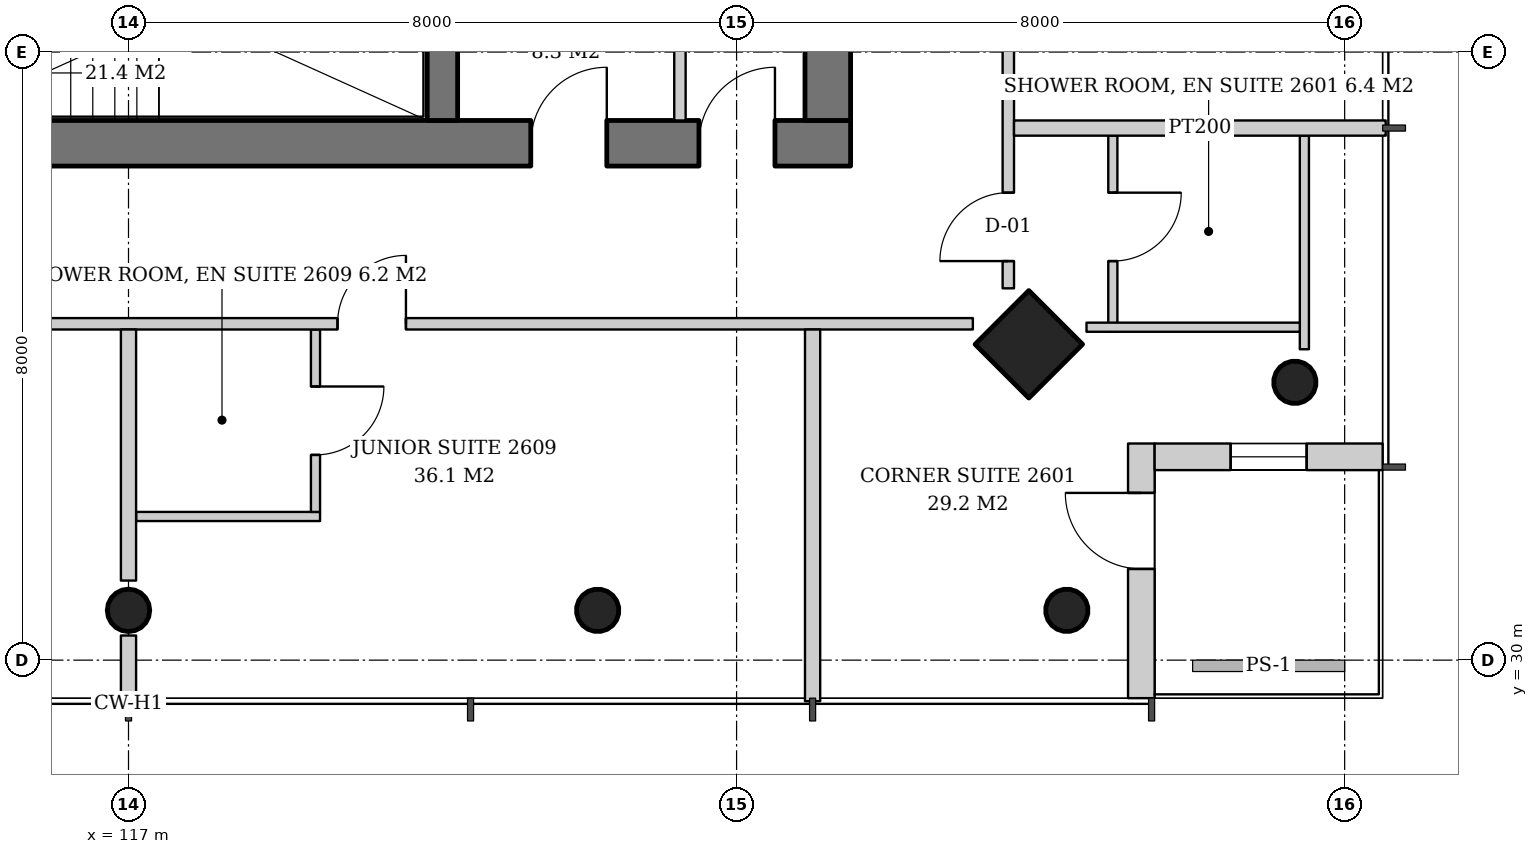
"""IFC4 building model, lengths in metres.
Left out: names, types, materials, properties, quantities, classifications, styles, units other than length and angle.
Written with IfcOpenShell. Run it as: python <this file> out.ifc"""

import sys

from ifc_helpers import new_model, si_unit, direction, frame, frame_2d, origin, origin_2d, place, context, subcontext, project, spatial, rectangle, hollow_circle, extrude, element, fill, save


model = new_model("IFC4")
c1 = context("Model", 3, precision=1e-05, world=origin(), true_north=direction((0.0, 1.0)))
c2 = subcontext(c1, "Body", "Model", "MODEL_VIEW")
j1 = project(units=[si_unit("LENGTHUNIT", "METRE"), si_unit("PLANEANGLEUNIT", "RADIAN")], contexts=[c1])
p1 = place(None, origin())
s1 = spatial("IfcSite", under=j1, at=p1, CompositionType="ELEMENT")
p2 = place(p1, origin())
s2 = spatial("IfcBuilding", under=s1, at=p2, CompositionType="ELEMENT")
p3 = place(p2, frame((0.0, 0.0, 104.6)))
s3 = spatial("IfcBuildingStorey", under=s2, at=p3, CompositionType="ELEMENT", Elevation=104.6)
p4 = place(p3, frame((132.396, 33.604, 0.0), z_axis=(-0.043032401563, 0.043032401563, 0.998146494675), x_axis=(-0.707106781187, -0.707106781187, 0.0)))
e1 = element("IfcColumn", 1, at=p4, inside=s3, PredefinedType="COLUMN", context=c2, shape_type="SweptSolid", body=[
    extrude(hollow_circle(Radius=0.28, WallThickness=0.02, at=origin_2d()), origin(), (0.0, 0.0, 1.0), 3.807),
])
p5 = place(p3, frame((128.896, 34.104, 0.0), z_axis=(-0.043032401563, 0.043032401563, 0.998146494675), x_axis=(-0.707106781187, -0.707106781187, 0.0)))
e2 = element("IfcColumn", 2, at=p5, inside=s3, PredefinedType="COLUMN", context=c2, shape_type="SweptSolid", body=[
    extrude(rectangle(XDim=1.0, YDim=1.0, at=origin_2d()), origin(), (0.0, 0.0, 1.0), 3.807),
])
p6 = place(p3, frame((129.396, 30.604, 0.0), z_axis=(-0.043032401563, 0.043032401563, 0.998146494675), x_axis=(-0.707106781187, -0.707106781187, 0.0)))
e3 = element("IfcColumn", 3, at=p6, inside=s3, PredefinedType="COLUMN", context=c2, shape_type="SweptSolid", body=[
    extrude(hollow_circle(Radius=0.28, WallThickness=0.02, at=origin_2d()), origin(), (0.0, 0.0, 1.0), 3.807),
])
p7 = place(p3, frame((117.0, 30.604, 0.0), z_axis=(0.0, 0.043072300418, 0.999071957837), x_axis=(-1.0, 0.0, 0.0)))
e4 = element("IfcColumn", 4, at=p7, inside=s3, PredefinedType="COLUMN", context=c2, shape_type="SweptSolid", body=[
    extrude(hollow_circle(Radius=0.28, WallThickness=0.02, at=origin_2d()), origin(), (0.0, 0.0, 1.0), 3.803),
])
p8 = place(p3, frame((123.198, 30.604, 0.0), z_axis=(-0.02149908433, 0.04306234503, 0.998841040313), x_axis=(-0.894693706707, -0.446680166538, 0.0)))
e5 = element("IfcColumn", 5, at=p8, inside=s3, PredefinedType="COLUMN", context=c2, shape_type="SweptSolid", body=[
    extrude(hollow_circle(Radius=0.28, WallThickness=0.02, at=origin_2d()), origin(), (0.0, 0.0, 1.0), 3.804),
])
p9 = place(p3, frame((107.5, 36.8, 0.0), z_axis=(0.0, 0.0, 1.0), x_axis=(1.0, 0.0, 0.0)))
e6 = element("IfcWall", 6, at=p9, inside=s3, PredefinedType="SHEAR", context=c2, shape_type="SweptSolid", body=[
    extrude(rectangle(XDim=19.0, YDim=0.6, at=frame_2d((9.5, 0.0))), origin(), (0.0, 0.0, 1.0), 3.8),
])
p10 = place(p9, frame((3.9, 0.0, 0.0)))
e7 = element("IfcOpeningElement", 7, at=p10, cuts=e6, PredefinedType="OPENING", context=c2, shape_type="SweptSolid", body=[
    extrude(rectangle(XDim=1.0, YDim=2.1, at=frame_2d((0.5, 1.05))), frame((0.0, 0.31, 0.0), z_axis=(0.0, -1.0, 0.0), x_axis=(1.0, 0.0, 0.0)), (0.0, 0.0, 1.0), 0.62),
])
p11 = place(p9, frame((14.792, 0.0, 0.0)))
e8 = element("IfcOpeningElement", 8, at=p11, cuts=e6, PredefinedType="OPENING", context=c2, shape_type="SweptSolid", body=[
    extrude(rectangle(XDim=1.0, YDim=2.1, at=frame_2d((0.5, 1.05))), frame((0.0, 0.31, 0.0), z_axis=(0.0, -1.0, 0.0), x_axis=(1.0, 0.0, 0.0)), (0.0, 0.0, 1.0), 0.62),
])
p12 = place(p9, frame((17.005, 0.0, 0.0)))
e9 = element("IfcOpeningElement", 9, at=p12, cuts=e6, PredefinedType="OPENING", context=c2, shape_type="SweptSolid", body=[
    extrude(rectangle(XDim=1.0, YDim=2.1, at=frame_2d((0.5, 1.05))), frame((0.0, 0.31, 0.0), z_axis=(0.0, -1.0, 0.0), x_axis=(1.0, 0.0, 0.0)), (0.0, 0.0, 1.0), 0.62),
])
p13 = place(p3, frame((126.2, 37.1, 0.0), z_axis=(0.0, 0.0, 1.0), x_axis=(0.0, 1.0, 0.0)))
e10 = element("IfcWall", 10, at=p13, inside=s3, PredefinedType="SHEAR", context=c2, shape_type="SweptSolid", body=[
    extrude(rectangle(XDim=17.8, YDim=0.6, at=frame_2d((8.9, 0.0))), origin(), (0.0, 0.0, 1.0), 3.8),
])
p14 = place(p13, frame((8.0, 0.0, 0.0)))
e11 = element("IfcOpeningElement", 11, at=p14, cuts=e10, PredefinedType="OPENING", context=c2, shape_type="SweptSolid", body=[
    extrude(rectangle(XDim=1.8, YDim=2.4, at=frame_2d((0.9, 1.2))), frame((0.0, 0.31, 0.0), z_axis=(0.0, -1.0, 0.0), x_axis=(1.0, 0.0, 0.0)), (0.0, 0.0, 1.0), 0.62),
])
p15 = place(p3, frame((121.13, 37.1, 0.0), z_axis=(0.0, 0.0, 1.0), x_axis=(0.0, 1.0, 0.0)))
e12 = element("IfcWall", 12, at=p15, inside=s3, PredefinedType="SHEAR", context=c2, shape_type="SweptSolid", body=[
    extrude(rectangle(XDim=2.9, YDim=0.4, at=frame_2d((1.45, 0.0))), origin(), (0.0, 0.0, 1.0), 3.8),
])
p16 = place(p3, frame((130.325, 29.5, 0.0), z_axis=(0.0, 0.0, 1.0), x_axis=(0.0, 1.0, 0.0)))
e13 = element("IfcWall", 13, at=p16, inside=s3, PredefinedType="SOLIDWALL", context=c2, shape_type="SweptSolid", body=[
    extrude(rectangle(XDim=3.35, YDim=0.35, at=frame_2d((1.675, 0.0))), origin(), (0.0, 0.0, 1.0), 3.6),
])
p17 = place(p16, frame((1.7, 0.0, 0.0)))
e14 = element("IfcOpeningElement", 14, at=p17, cuts=e13, PredefinedType="OPENING", context=c2, shape_type="SweptSolid", body=[
    extrude(rectangle(XDim=1.0, YDim=2.4, at=frame_2d((0.5, 1.2))), frame((0.0, 0.185, 0.0), z_axis=(0.0, -1.0, 0.0), x_axis=(1.0, 0.0, 0.0)), (0.0, 0.0, 1.0), 0.37),
])
p18 = place(p3, frame((130.5, 32.675, 0.0), z_axis=(0.0, 0.0, 1.0), x_axis=(1.0, 0.0, 0.0)))
e15 = element("IfcWall", 15, at=p18, inside=s3, PredefinedType="SOLIDWALL", context=c2, shape_type="SweptSolid", body=[
    extrude(rectangle(XDim=3.0, YDim=0.35, at=frame_2d((1.5, 0.0))), origin(), (0.0, 0.0, 1.0), 3.6),
])
p19 = place(p18, frame((1.0, 0.0, 0.9)))
e16 = element("IfcOpeningElement", 16, at=p19, cuts=e15, PredefinedType="OPENING", context=c2, shape_type="SweptSolid", body=[
    extrude(rectangle(XDim=1.0, YDim=2.4, at=frame_2d((0.5, 1.2))), frame((0.0, 0.185, 0.0), z_axis=(0.0, -1.0, 0.0), x_axis=(1.0, 0.0, 0.0)), (0.0, 0.0, 1.0), 0.37),
])
p20 = place(p3, frame((124.255, 37.1, 0.0), z_axis=(0.0, 0.0, 1.0), x_axis=(0.0, 1.0, 0.0)))
e17 = element("IfcWall", 17, at=p20, inside=s3, PredefinedType="SOLIDWALL", context=c2, shape_type="SweptSolid", body=[
    extrude(rectangle(XDim=2.9, YDim=0.15, at=frame_2d((1.45, 0.0))), origin(), (0.0, 0.0, 1.0), 3.6),
])
p21 = place(p3, frame((129.95, 36.9, 0.0), z_axis=(0.0, 0.0, 1.0), x_axis=(0.0, -1.0, 0.0)))
e18 = element("IfcWall", 18, at=p21, inside=s3, PredefinedType="PARTITIONING", context=c2, shape_type="SweptSolid", body=[
    extrude(rectangle(XDim=2.58, YDim=0.12, at=frame_2d((1.29, 0.0))), origin(), (0.0, 0.0, 1.0), 2.9),
])
p22 = place(p21, frame((0.75, 0.0, 0.0)))
e19 = element("IfcOpeningElement", 19, at=p22, cuts=e18, PredefinedType="OPENING", context=c2, shape_type="SweptSolid", body=[
    extrude(rectangle(XDim=0.9, YDim=2.1, at=frame_2d((0.45, 1.05))), frame((0.0, 0.07, 0.0), z_axis=(0.0, -1.0, 0.0), x_axis=(1.0, 0.0, 0.0)), (0.0, 0.0, 1.0), 0.14),
])
p23 = place(p3, frame((132.47, 36.9, 0.0), z_axis=(0.0, 0.0, 1.0), x_axis=(0.0, -1.0, 0.0)))
e20 = element("IfcWall", 20, at=p23, inside=s3, PredefinedType="PARTITIONING", context=c2, shape_type="SweptSolid", body=[
    extrude(rectangle(XDim=2.81, YDim=0.12, at=frame_2d((1.405, 0.0))), origin(), (0.0, 0.0, 1.0), 3.6),
])
p24 = place(p3, frame((129.604, 34.38, 0.0), z_axis=(0.0, 0.0, 1.0), x_axis=(1.0, 0.0, 0.0)))
e21 = element("IfcWall", 21, at=p24, inside=s3, PredefinedType="PARTITIONING", context=c2, shape_type="SweptSolid", body=[
    extrude(rectangle(XDim=2.806, YDim=0.12, at=frame_2d((1.403, 0.0))), origin(), (0.0, 0.0, 1.0), 3.2),
])
p25 = place(p3, frame((128.575, 34.892, 0.0), z_axis=(0.0, 0.0, 1.0), x_axis=(0.0, 1.0, 0.0)))
e22 = element("IfcWall", 22, at=p25, inside=s3, PredefinedType="PARTITIONING", context=c2, shape_type="SweptSolid", body=[
    extrude(rectangle(XDim=22.217, YDim=0.15, at=frame_2d((11.108, 0.0))), origin(), (0.0, 0.0, 1.0), 2.9),
])
p26 = place(p25, frame((0.358, 0.0, 0.0)))
e23 = element("IfcOpeningElement", 23, at=p26, cuts=e22, PredefinedType="OPENING", context=c2, shape_type="SweptSolid", body=[
    extrude(rectangle(XDim=0.9, YDim=2.1, at=frame_2d((0.45, 1.05))), frame((0.0, 0.085, 0.0), z_axis=(0.0, -1.0, 0.0), x_axis=(1.0, 0.0, 0.0)), (0.0, 0.0, 1.0), 0.17),
])
p27 = place(p25, frame((4.808, 0.0, 0.0)))
e24 = element("IfcOpeningElement", 24, at=p27, cuts=e22, PredefinedType="OPENING", context=c2, shape_type="SweptSolid", body=[
    extrude(rectangle(XDim=1.0, YDim=2.1, at=frame_2d((0.5, 1.05))), frame((0.0, 0.085, 0.0), z_axis=(0.0, -1.0, 0.0), x_axis=(1.0, 0.0, 0.0)), (0.0, 0.0, 1.0), 0.17),
])
p28 = place(p25, frame((13.858, 0.0, 0.0)))
e25 = element("IfcOpeningElement", 25, at=p28, cuts=e22, PredefinedType="OPENING", context=c2, shape_type="SweptSolid", body=[
    extrude(rectangle(XDim=0.9, YDim=2.1, at=frame_2d((0.45, 1.05))), frame((0.0, 0.085, 0.0), z_axis=(0.0, -1.0, 0.0), x_axis=(1.0, 0.0, 0.0)), (0.0, 0.0, 1.0), 0.17),
])
p29 = place(p3, frame((128.65, 37.0, 0.0), z_axis=(0.0, 0.0, 1.0), x_axis=(1.0, 0.0, 0.0)))
e26 = element("IfcWall", 26, at=p29, inside=s3, PredefinedType="PARTITIONING", context=c2, shape_type="SweptSolid", body=[
    extrude(rectangle(XDim=4.89, YDim=0.2, at=frame_2d((2.445, 0.0))), origin(), (0.0, 0.0, 1.0), 2.9),
])
p30 = place(p3, frame((117.1, 31.89, 0.0), z_axis=(0.0, 0.0, 1.0), x_axis=(1.0, 0.0, 0.0)))
e27 = element("IfcWall", 27, at=p30, inside=s3, PredefinedType="PARTITIONING", context=c2, shape_type="SweptSolid", body=[
    extrude(rectangle(XDim=2.42, YDim=0.12, at=frame_2d((1.21, 0.0))), origin(), (0.0, 0.0, 1.0), 3.6),
])
p31 = place(p3, frame((119.46, 34.35, 0.0), z_axis=(0.0, 0.0, 1.0), x_axis=(0.0, -1.0, 0.0)))
e28 = element("IfcWall", 28, at=p31, inside=s3, PredefinedType="PARTITIONING", context=c2, shape_type="SweptSolid", body=[
    extrude(rectangle(XDim=2.4, YDim=0.12, at=frame_2d((1.2, 0.0))), origin(), (0.0, 0.0, 1.0), 3.6),
])
p32 = place(p31, frame((0.75, 0.0, 0.0)))
e29 = element("IfcOpeningElement", 29, at=p32, cuts=e28, PredefinedType="OPENING", context=c2, shape_type="SweptSolid", body=[
    extrude(rectangle(XDim=0.9, YDim=2.1, at=frame_2d((0.45, 1.05))), frame((0.0, 0.07, 0.0), z_axis=(0.0, -1.0, 0.0), x_axis=(1.0, 0.0, 0.0)), (0.0, 0.0, 1.0), 0.14),
])
p33 = place(p3, frame((105.892, 34.425, 0.0), z_axis=(0.0, 0.0, 1.0), x_axis=(1.0, 0.0, 0.0)))
e30 = element("IfcWall", 30, at=p33, inside=s3, PredefinedType="PARTITIONING", context=c2, shape_type="SweptSolid", body=[
    extrude(rectangle(XDim=22.217, YDim=0.15, at=frame_2d((11.108, 0.0))), origin(), (0.0, 0.0, 1.0), 2.9),
])
p34 = place(p33, frame((0.358, 0.0, 0.0)))
e31 = element("IfcOpeningElement", 31, at=p34, cuts=e30, PredefinedType="OPENING", context=c2, shape_type="SweptSolid", body=[
    extrude(rectangle(XDim=0.9, YDim=2.1, at=frame_2d((0.45, 1.05))), frame((0.0, 0.085, 0.0), z_axis=(0.0, -1.0, 0.0), x_axis=(1.0, 0.0, 0.0)), (0.0, 0.0, 1.0), 0.17),
])
p35 = place(p33, frame((4.858, 0.0, 0.0)))
e32 = element("IfcOpeningElement", 32, at=p35, cuts=e30, PredefinedType="OPENING", context=c2, shape_type="SweptSolid", body=[
    extrude(rectangle(XDim=0.9, YDim=2.1, at=frame_2d((0.45, 1.05))), frame((0.0, 0.085, 0.0), z_axis=(0.0, -1.0, 0.0), x_axis=(1.0, 0.0, 0.0)), (0.0, 0.0, 1.0), 0.17),
])
p36 = place(p33, frame((13.858, 0.0, 0.0)))
e33 = element("IfcOpeningElement", 33, at=p36, cuts=e30, PredefinedType="OPENING", context=c2, shape_type="SweptSolid", body=[
    extrude(rectangle(XDim=0.9, YDim=2.1, at=frame_2d((0.45, 1.05))), frame((0.0, 0.085, 0.0), z_axis=(0.0, -1.0, 0.0), x_axis=(1.0, 0.0, 0.0)), (0.0, 0.0, 1.0), 0.17),
])
p37 = place(p3, frame((117.0, 34.35, 0.0), z_axis=(0.0, 0.0, 1.0), x_axis=(0.0, -1.0, 0.0)))
e34 = element("IfcWall", 34, at=p37, inside=s3, PredefinedType="PARTITIONING", context=c2, shape_type="SweptSolid", body=[
    extrude(rectangle(XDim=3.303, YDim=0.2, at=frame_2d((1.652, 0.0))), origin(), (0.0, 0.0, 1.0), 3.6),
])
p38 = place(p3, frame((117.0, 30.324, 0.0), z_axis=(0.0, 0.0, 1.0), x_axis=(0.0, -1.0, 0.0)))
e35 = element("IfcWall", 35, at=p38, inside=s3, PredefinedType="PARTITIONING", context=c2, shape_type="SweptSolid", body=[
    extrude(rectangle(XDim=0.864, YDim=0.2, at=frame_2d((0.432, 0.0))), origin(), (0.0, 0.0, 1.0), 3.6),
])
p39 = place(p3, frame((126.0, 34.35, 0.0), z_axis=(0.0, 0.0, 1.0), x_axis=(0.0, -1.0, 0.0)))
e36 = element("IfcWall", 36, at=p39, inside=s3, PredefinedType="PARTITIONING", context=c2, shape_type="SweptSolid", body=[
    extrude(rectangle(XDim=4.89, YDim=0.2, at=frame_2d((2.445, 0.0))), origin(), (0.0, 0.0, 1.0), 3.2),
])
p40 = place(p17, origin())
e37 = element("IfcDoor", 37, at=p40, inside=s3, OperationType="SINGLE_SWING_RIGHT", PredefinedType="DOOR", context=c2, shape_type="SweptSolid", body=[
    extrude(rectangle(XDim=1.0, YDim=2.4, at=frame_2d((0.5, 1.2))), frame((0.0, 0.025, 0.0), z_axis=(0.0, -1.0, 0.0), x_axis=(1.0, 0.0, 0.0)), (0.0, 0.0, 1.0), 0.05),
])
fill(e14, e37)
p41 = place(p19, origin())
e38 = element("IfcWindow", 38, at=p41, inside=s3, PartitioningType="SINGLE_PANEL", PredefinedType="WINDOW", context=c2, shape_type="SweptSolid", body=[
    extrude(rectangle(XDim=1.0, YDim=2.4, at=frame_2d((0.5, 1.2))), frame((0.0, 0.03, 0.0), z_axis=(0.0, -1.0, 0.0), x_axis=(1.0, 0.0, 0.0)), (0.0, 0.0, 1.0), 0.06),
])
fill(e16, e38)
p42 = place(p11, origin())
e39 = element("IfcDoor", 39, at=p42, inside=s3, OperationType="SINGLE_SWING_RIGHT", PredefinedType="DOOR", context=c2, shape_type="SweptSolid", body=[
    extrude(rectangle(XDim=1.0, YDim=2.1, at=frame_2d((0.5, 1.05))), frame((0.0, 0.29, 0.0), z_axis=(0.0, -1.0, 0.0), x_axis=(1.0, 0.0, 0.0)), (0.0, 0.0, 1.0), 0.05),
])
fill(e8, e39)
p43 = place(p12, origin())
e40 = element("IfcDoor", 40, at=p43, inside=s3, OperationType="SINGLE_SWING_RIGHT", PredefinedType="DOOR", context=c2, shape_type="SweptSolid", body=[
    extrude(rectangle(XDim=1.0, YDim=2.1, at=frame_2d((0.5, 1.05))), frame((0.0, 0.29, 0.0), z_axis=(0.0, -1.0, 0.0), x_axis=(1.0, 0.0, 0.0)), (0.0, 0.0, 1.0), 0.05),
])
fill(e9, e40)
p44 = place(p22, origin())
e41 = element("IfcDoor", 41, at=p44, inside=s3, OperationType="SINGLE_SWING_LEFT", PredefinedType="DOOR", context=c2, shape_type="SweptSolid", body=[
    extrude(rectangle(XDim=0.9, YDim=2.1, at=frame_2d((0.45, 1.05))), frame((0.0, 0.025, 0.0), z_axis=(0.0, -1.0, 0.0), x_axis=(1.0, 0.0, 0.0)), (0.0, 0.0, 1.0), 0.05),
])
fill(e19, e41)
p45 = place(p26, origin())
e42 = element("IfcDoor", 42, at=p45, inside=s3, OperationType="SINGLE_SWING_LEFT", PredefinedType="DOOR", context=c2, shape_type="SweptSolid", body=[
    extrude(rectangle(XDim=0.9, YDim=2.1, at=frame_2d((0.45, 1.05))), frame((0.0, 0.025, 0.0), z_axis=(0.0, -1.0, 0.0), x_axis=(1.0, 0.0, 0.0)), (0.0, 0.0, 1.0), 0.05),
])
fill(e23, e42)
p46 = place(p32, origin())
e43 = element("IfcDoor", 43, at=p46, inside=s3, OperationType="SINGLE_SWING_LEFT", PredefinedType="DOOR", context=c2, shape_type="SweptSolid", body=[
    extrude(rectangle(XDim=0.9, YDim=2.1, at=frame_2d((0.45, 1.05))), frame((0.0, 0.025, 0.0), z_axis=(0.0, -1.0, 0.0), x_axis=(1.0, 0.0, 0.0)), (0.0, 0.0, 1.0), 0.05),
])
fill(e29, e43)
p47 = place(p36, origin())
e44 = element("IfcDoor", 44, at=p47, inside=s3, OperationType="SINGLE_SWING_RIGHT", PredefinedType="DOOR", context=c2, shape_type="SweptSolid", body=[
    extrude(rectangle(XDim=0.9, YDim=2.1, at=frame_2d((0.45, 1.05))), frame((0.0, 0.025, 0.0), z_axis=(0.0, -1.0, 0.0), x_axis=(1.0, 0.0, 0.0)), (0.0, 0.0, 1.0), 0.05),
])
fill(e33, e44)
save(model, sys.argv[1])
